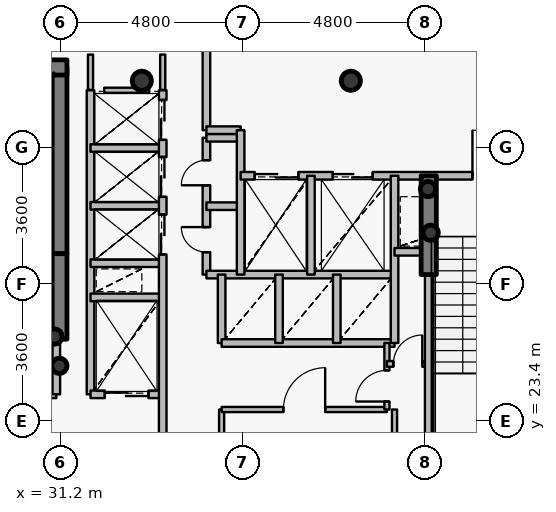
"""IFC4 building model, lengths in metres.
Left out: names, types, materials, properties, quantities, classifications, styles, units other than length and angle.
Written with IfcOpenShell. Run it as: python <this file> out.ifc"""

import sys

from ifc_helpers import new_model, si_unit, direction, frame, frame_2d, origin, origin_2d, place, context, subcontext, project, spatial, rectangle, hollow_circle, extrude, source, transform, mapped, element, fill, save


model = new_model("IFC4")
c1 = context("Model", 3, precision=1e-05, world=origin(), true_north=direction((0.0, 1.0)))
c2 = subcontext(c1, "Body", "Model", "MODEL_VIEW")
j1 = project(units=[si_unit("LENGTHUNIT", "METRE"), si_unit("PLANEANGLEUNIT", "RADIAN")], contexts=[c1])
p1 = place(None, origin())
s1 = spatial("IfcSite", under=j1, at=p1, CompositionType="ELEMENT")
p2 = place(p1, origin())
s2 = spatial("IfcBuilding", under=s1, at=p2, CompositionType="ELEMENT")
p3 = place(p2, frame((0.0, 0.0, 232.8)))
s3 = spatial("IfcBuildingStorey", under=s2, at=p3, CompositionType="ELEMENT", Elevation=232.8)
for number, where, z_axis, x_axis in (
    (1, (38.85, 32.35, 0.0), (0.0, 0.0, 1.0), (1.0, 0.0, 0.0)),
    (2, (33.35, 32.35, 0.0), (0.0, 0.0, 1.0), (1.0, 0.0, 0.0)),
):
    element("IfcColumn", number, at=place(p3, frame(where, z_axis=z_axis, x_axis=x_axis)), inside=s3, PredefinedType="COLUMN", context=c2, shape_type="SweptSolid", body=[
        extrude(hollow_circle(Radius=0.254, WallThickness=0.02, at=origin_2d()), origin(), (0.0, 0.0, 1.0), 3.75),
    ])
p4 = place(p3, frame((31.18, 27.8, 0.0), z_axis=(0.0, 0.0, 1.0), x_axis=(0.0, 1.0, 0.0)))
e3 = element("IfcWall", 3, at=p4, inside=s3, PredefinedType="SHEAR", context=c2, shape_type="SweptSolid", body=[
    extrude(rectangle(XDim=4.9, YDim=0.4, at=frame_2d((2.45, 0.0))), origin(), (0.0, 0.0, 1.0), 3.75),
])
p5 = place(p3, frame((27.28, 32.7, 0.0), z_axis=(0.0, 0.0, 1.0), x_axis=(1.0, 0.0, 0.0)))
e4 = element("IfcWall", 4, at=p5, inside=s3, PredefinedType="SHEAR", context=c2, shape_type="SweptSolid", body=[
    extrude(rectangle(XDim=4.1, YDim=0.4, at=frame_2d((2.05, 0.0))), origin(), (0.0, 0.0, 1.0), 3.75),
])
for number, where, z_axis, x_axis in (
    (5, (31.05, 25.62, 0.0), (0.0, 0.0, 1.0), (1.0, 0.0, 0.0)),
    (6, (31.18, 24.85, 0.0), (0.0, 0.0, 1.0), (1.0, 0.0, 0.0)),
    (7, (40.95, 28.35, 0.0), (0.0, 0.0, 1.0), (1.0, 0.0, 0.0)),
    (8, (40.88, 29.5, 0.0), (0.0, 0.0, 1.0), (1.0, 0.0, 0.0)),
):
    element("IfcColumn", number, at=place(p3, frame(where, z_axis=z_axis, x_axis=x_axis)), inside=s3, PredefinedType="COLUMN", context=c2, shape_type="SweptSolid", body=[
        extrude(hollow_circle(Radius=0.203, WallThickness=0.016, at=origin_2d()), origin(), (0.0, 0.0, 1.0), 3.75),
    ])
p6 = place(p3, frame((31.18, 25.55, 0.0), z_axis=(0.0, 0.0, 1.0), x_axis=(0.0, 1.0, 0.0)))
e9 = element("IfcWall", 9, at=p6, inside=s3, PredefinedType="SHEAR", context=c2, shape_type="SweptSolid", body=[
    extrude(rectangle(XDim=2.25, YDim=0.4, at=frame_2d((1.125, 0.0))), origin(), (0.0, 0.0, 1.0), 3.1),
])
p7 = place(p3, frame((40.9, 27.25, 0.0), z_axis=(0.0, 0.0, 1.0), x_axis=(0.0, 1.0, 0.0)))
e10 = element("IfcWall", 10, at=p7, inside=s3, PredefinedType="SHEAR", context=c2, shape_type="SweptSolid", body=[
    extrude(rectangle(XDim=2.6, YDim=0.4, at=frame_2d((1.3, 0.0))), origin(), (0.0, 0.0, 1.0), 3.1),
])
p8 = place(p3, frame((27.56, 24.1, 0.0), z_axis=(0.0, 0.0, 1.0), x_axis=(1.0, 0.0, 0.0)))
e11 = element("IfcWall", 11, at=p8, inside=s3, PredefinedType="PARTITIONING", context=c2, shape_type="SweptSolid", body=[
    extrude(rectangle(XDim=3.54, YDim=0.2, at=frame_2d((1.77, 0.0))), origin(), (0.0, 0.0, 1.0), 3.5),
])
p9 = place(p8, frame((1.17, 0.0, 0.0)))
e12 = element("IfcOpeningElement", 12, at=p9, cuts=e11, PredefinedType="OPENING", context=c2, shape_type="SweptSolid", body=[
    extrude(rectangle(XDim=1.2, YDim=2.15, at=origin_2d()), frame((0.6, 0.11, 1.075), z_axis=(0.0, -1.0, 0.0), x_axis=(1.0, 0.0, 0.0)), (0.0, 0.0, 1.0), 0.22),
])
p10 = place(p3, frame((31.1, 24.1, 0.0), z_axis=(0.0, 0.0, 1.0), x_axis=(0.0, 1.0, 0.0)))
e13 = element("IfcWall", 13, at=p10, inside=s3, PredefinedType="PARTITIONING", context=c2, shape_type="SweptSolid", body=[
    extrude(rectangle(XDim=1.44, YDim=0.2, at=frame_2d((0.72, 0.0))), origin(), (0.0, 0.0, 1.0), 3.5),
])
p11 = place(p3, frame((32.0, 24.1, 0.0), z_axis=(0.0, 0.0, 1.0), x_axis=(0.0, 1.0, 0.0)))
e14 = element("IfcWall", 14, at=p11, inside=s3, PredefinedType="PARTITIONING", context=c2, shape_type="SweptSolid", body=[
    extrude(rectangle(XDim=8.0, YDim=0.2, at=frame_2d((4.0, 0.0))), origin(), (0.0, 0.0, 1.0), 3.5),
])
p12 = place(p3, frame((32.0, 24.1, 0.0), z_axis=(0.0, 0.0, 1.0), x_axis=(1.0, 0.0, 0.0)))
e15 = element("IfcWall", 15, at=p12, inside=s3, PredefinedType="PARTITIONING", context=c2, shape_type="SweptSolid", body=[
    extrude(rectangle(XDim=1.9, YDim=0.2, at=frame_2d((0.95, 0.0))), origin(), (0.0, 0.0, 1.0), 3.085),
])
p13 = place(p12, frame((0.375, 0.0, 0.0)))
e16 = element("IfcOpeningElement", 16, at=p13, cuts=e15, PredefinedType="OPENING", context=c2, shape_type="SweptSolid", body=[
    extrude(rectangle(XDim=1.15, YDim=2.15, at=origin_2d()), frame((0.575, 0.11, 1.075), z_axis=(0.0, -1.0, 0.0), x_axis=(1.0, 0.0, 0.0)), (0.0, 0.0, 1.0), 0.22),
])
for number, where, z_axis, x_axis in (
    (17, (32.0, 26.65, 0.0), (0.0, 0.0, 1.0), (1.0, 0.0, 0.0)),
    (18, (32.0, 27.55, 0.0), (0.0, 0.0, 1.0), (1.0, 0.0, 0.0)),
    (19, (32.0, 29.06, 0.0), (0.0, 0.0, 1.0), (1.0, 0.0, 0.0)),
    (20, (32.0, 30.58, 0.0), (0.0, 0.0, 1.0), (1.0, 0.0, 0.0)),
):
    element("IfcWall", number, at=place(p3, frame(where, z_axis=z_axis, x_axis=x_axis)), inside=s3, PredefinedType="PARTITIONING", context=c2, shape_type="SweptSolid", body=[
        extrude(rectangle(XDim=1.9, YDim=0.2, at=frame_2d((0.95, 0.0))), origin(), (0.0, 0.0, 1.0), 3.085),
    ])
p14 = place(p3, frame((33.9, 20.7, 0.0), z_axis=(0.0, 0.0, 1.0), x_axis=(0.0, 1.0, 0.0)))
e21 = element("IfcWall", 21, at=p14, inside=s3, PredefinedType="PARTITIONING", context=c2, shape_type="SweptSolid", body=[
    extrude(rectangle(XDim=11.4, YDim=0.2, at=frame_2d((5.7, 0.0))), origin(), (0.0, 0.0, 1.0), 3.085),
])
p15 = place(p14, frame((7.08, 0.0, 0.0)))
e22 = element("IfcOpeningElement", 22, at=p15, cuts=e21, PredefinedType="OPENING", context=c2, shape_type="SweptSolid", body=[
    extrude(rectangle(XDim=1.05, YDim=2.15, at=origin_2d()), frame((0.525, 0.11, 1.075), z_axis=(0.0, -1.0, 0.0), x_axis=(1.0, 0.0, 0.0)), (0.0, 0.0, 1.0), 0.22),
])
p16 = place(p14, frame((8.595, 0.0, 0.0)))
e23 = element("IfcOpeningElement", 23, at=p16, cuts=e21, PredefinedType="OPENING", context=c2, shape_type="SweptSolid", body=[
    extrude(rectangle(XDim=1.05, YDim=2.15, at=origin_2d()), frame((0.525, 0.11, 1.075), z_axis=(0.0, -1.0, 0.0), x_axis=(1.0, 0.0, 0.0)), (0.0, 0.0, 1.0), 0.22),
])
p17 = place(p14, frame((10.095, 0.0, 0.0)))
e24 = element("IfcOpeningElement", 24, at=p17, cuts=e21, PredefinedType="OPENING", context=c2, shape_type="SweptSolid", body=[
    extrude(rectangle(XDim=1.05, YDim=2.15, at=origin_2d()), frame((0.525, 0.11, 1.075), z_axis=(0.0, -1.0, 0.0), x_axis=(1.0, 0.0, 0.0)), (0.0, 0.0, 1.0), 0.22),
])
p18 = place(p3, frame((35.05, 27.25, 0.0), z_axis=(0.0, 0.0, 1.0), x_axis=(0.0, 1.0, 0.0)))
e25 = element("IfcWall", 25, at=p18, inside=s3, PredefinedType="PARTITIONING", context=c2, shape_type="SweptSolid", body=[
    extrude(rectangle(XDim=3.6, YDim=0.2, at=frame_2d((1.8, 0.0))), origin(), (0.0, 0.0, 1.0), 3.5),
])
p19 = place(p18, frame((0.59, 0.0, 0.0)))
e26 = element("IfcOpeningElement", 26, at=p19, cuts=e25, PredefinedType="OPENING", context=c2, shape_type="SweptSolid", body=[
    extrude(rectangle(XDim=0.66, YDim=2.05, at=origin_2d()), frame((0.33, 0.11, 1.025), z_axis=(0.0, -1.0, 0.0), x_axis=(1.0, 0.0, 0.0)), (0.0, 0.0, 1.0), 0.22),
])
p20 = place(p18, frame((2.35, 0.0, 0.0)))
e27 = element("IfcOpeningElement", 27, at=p20, cuts=e25, PredefinedType="OPENING", context=c2, shape_type="SweptSolid", body=[
    extrude(rectangle(XDim=0.66, YDim=2.05, at=origin_2d()), frame((0.33, 0.11, 1.025), z_axis=(0.0, -1.0, 0.0), x_axis=(1.0, 0.0, 0.0)), (0.0, 0.0, 1.0), 0.22),
])
p21 = place(p3, frame((35.05, 27.25, 0.0), z_axis=(0.0, 0.0, 1.0), x_axis=(1.0, 0.0, 0.0)))
e28 = element("IfcWall", 28, at=p21, inside=s3, PredefinedType="PARTITIONING", context=c2, shape_type="SweptSolid", body=[
    extrude(rectangle(XDim=4.95, YDim=0.2, at=frame_2d((2.475, 0.0))), origin(), (0.0, 0.0, 1.0), 3.085),
])
for number, where, z_axis, x_axis in (
    (29, (35.05, 29.05, 0.0), (0.0, 0.0, 1.0), (1.0, 0.0, 0.0)),
    (30, (35.05, 30.85, 0.0), (0.0, 0.0, 1.0), (1.0, 0.0, 0.0)),
):
    element("IfcWall", number, at=place(p3, frame(where, z_axis=z_axis, x_axis=x_axis)), inside=s3, PredefinedType="PARTITIONING", context=c2, shape_type="SweptSolid", body=[
        extrude(rectangle(XDim=0.9, YDim=0.2, at=frame_2d((0.45, 0.0))), origin(), (0.0, 0.0, 1.0), 3.5),
    ])
p22 = place(p3, frame((35.05, 31.05, 0.0), z_axis=(0.0, 0.0, 1.0), x_axis=(0.0, 1.0, 0.0)))
e31 = element("IfcWall", 31, at=p22, inside=s3, PredefinedType="PARTITIONING", context=c2, shape_type="SweptSolid", body=[
    extrude(rectangle(XDim=2.25, YDim=0.2, at=frame_2d((1.125, 0.0))), origin(), (0.0, 0.0, 1.0), 3.085),
])
p23 = place(p3, frame((35.05, 31.05, 0.0), z_axis=(0.0, 0.0, 1.0), x_axis=(1.0, 0.0, 0.0)))
e32 = element("IfcWall", 32, at=p23, inside=s3, PredefinedType="PARTITIONING", context=c2, shape_type="SweptSolid", body=[
    extrude(rectangle(XDim=0.9, YDim=0.2, at=frame_2d((0.45, 0.0))), origin(), (0.0, 0.0, 1.0), 3.5),
])
p24 = place(p3, frame((35.45, 20.7, 0.0), z_axis=(0.0, 0.0, 1.0), x_axis=(0.0, 1.0, 0.0)))
e33 = element("IfcWall", 33, at=p24, inside=s3, PredefinedType="PARTITIONING", context=c2, shape_type="SweptSolid", body=[
    extrude(rectangle(XDim=3.0, YDim=0.135, at=frame_2d((1.5, 0.0))), origin(), (0.0, 0.0, 1.0), 3.085),
])
p25 = place(p3, frame((35.45, 23.7, 0.0), z_axis=(0.0, 0.0, 1.0), x_axis=(1.0, 0.0, 0.0)))
e34 = element("IfcWall", 34, at=p25, inside=s3, PredefinedType="PARTITIONING", context=c2, shape_type="SweptSolid", body=[
    extrude(rectangle(XDim=4.35, YDim=0.135, at=frame_2d((2.175, 0.0))), origin(), (0.0, 0.0, 1.0), 3.085),
])
p26 = place(p25, frame((1.625, 0.0, 0.0)))
e35 = element("IfcOpeningElement", 35, at=p26, cuts=e34, PredefinedType="OPENING", context=c2, shape_type="SweptSolid", body=[
    extrude(rectangle(XDim=1.1, YDim=2.15, at=origin_2d()), frame((0.55, 0.078, 1.075), z_axis=(0.0, -1.0, 0.0), x_axis=(1.0, 0.0, 0.0)), (0.0, 0.0, 1.0), 0.155),
])
p27 = place(p3, frame((35.45, 25.45, 0.0), z_axis=(0.0, 0.0, 1.0), x_axis=(0.0, 1.0, 0.0)))
e36 = element("IfcWall", 36, at=p27, inside=s3, PredefinedType="PARTITIONING", context=c2, shape_type="SweptSolid", body=[
    extrude(rectangle(XDim=1.8, YDim=0.2, at=frame_2d((0.9, 0.0))), origin(), (0.0, 0.0, 1.0), 3.5),
])
p28 = place(p3, frame((35.45, 25.45, 0.0), z_axis=(0.0, 0.0, 1.0), x_axis=(1.0, 0.0, 0.0)))
e37 = element("IfcWall", 37, at=p28, inside=s3, PredefinedType="PARTITIONING", context=c2, shape_type="SweptSolid", body=[
    extrude(rectangle(XDim=4.55, YDim=0.2, at=frame_2d((2.275, 0.0))), origin(), (0.0, 0.0, 1.0), 3.085),
])
p29 = place(p3, frame((35.95, 27.25, 0.0), z_axis=(0.0, 0.0, 1.0), x_axis=(0.0, 1.0, 0.0)))
e38 = element("IfcWall", 38, at=p29, inside=s3, PredefinedType="PARTITIONING", context=c2, shape_type="SweptSolid", body=[
    extrude(rectangle(XDim=3.8, YDim=0.2, at=frame_2d((1.9, 0.0))), origin(), (0.0, 0.0, 1.0), 3.5),
])
p30 = place(p3, frame((35.95, 29.85, 0.0), z_axis=(0.0, 0.0, 1.0), x_axis=(1.0, 0.0, 0.0)))
e39 = element("IfcWall", 39, at=p30, inside=s3, PredefinedType="PARTITIONING", context=c2, shape_type="SweptSolid", body=[
    extrude(rectangle(XDim=8.49, YDim=0.2, at=frame_2d((4.245, 0.0))), origin(), (0.0, 0.0, 1.0), 3.085),
])
p31 = place(p30, frame((6.1, 0.0, 0.0)))
e40 = element("IfcOpeningElement", 40, at=p31, cuts=e39, PredefinedType="OPENING", context=c2, shape_type="SweptSolid", body=[
    extrude(rectangle(XDim=1.2, YDim=2.15, at=origin_2d()), frame((0.6, 0.11, 1.075), z_axis=(0.0, -1.0, 0.0), x_axis=(1.0, 0.0, 0.0)), (0.0, 0.0, 1.0), 0.22),
])
p32 = place(p30, frame((0.37, 0.0, 0.0)))
e41 = element("IfcOpeningElement", 41, at=p32, cuts=e39, PredefinedType="OPENING", context=c2, shape_type="SweptSolid", body=[
    extrude(rectangle(XDim=1.15, YDim=2.15, at=origin_2d()), frame((0.575, 0.11, 1.075), z_axis=(0.0, -1.0, 0.0), x_axis=(1.0, 0.0, 0.0)), (0.0, 0.0, 1.0), 0.22),
])
p33 = place(p30, frame((2.425, 0.0, 0.0)))
e42 = element("IfcOpeningElement", 42, at=p33, cuts=e39, PredefinedType="OPENING", context=c2, shape_type="SweptSolid", body=[
    extrude(rectangle(XDim=1.05, YDim=2.15, at=origin_2d()), frame((0.525, 0.11, 1.075), z_axis=(0.0, -1.0, 0.0), x_axis=(1.0, 0.0, 0.0)), (0.0, 0.0, 1.0), 0.22),
])
p34 = place(p3, frame((36.96, 25.45, 0.0), z_axis=(0.0, 0.0, 1.0), x_axis=(0.0, 1.0, 0.0)))
e43 = element("IfcWall", 43, at=p34, inside=s3, PredefinedType="PARTITIONING", context=c2, shape_type="SweptSolid", body=[
    extrude(rectangle(XDim=1.8, YDim=0.2, at=frame_2d((0.9, 0.0))), origin(), (0.0, 0.0, 1.0), 3.5),
])
p35 = place(p3, frame((37.8, 27.25, 0.0), z_axis=(0.0, 0.0, 1.0), x_axis=(0.0, 1.0, 0.0)))
e44 = element("IfcWall", 44, at=p35, inside=s3, PredefinedType="PARTITIONING", context=c2, shape_type="SweptSolid", body=[
    extrude(rectangle(XDim=2.6, YDim=0.2, at=frame_2d((1.3, 0.0))), origin(), (0.0, 0.0, 1.0), 3.5),
])
p36 = place(p3, frame((38.48, 25.45, 0.0), z_axis=(0.0, 0.0, 1.0), x_axis=(0.0, 1.0, 0.0)))
e45 = element("IfcWall", 45, at=p36, inside=s3, PredefinedType="PARTITIONING", context=c2, shape_type="SweptSolid", body=[
    extrude(rectangle(XDim=1.8, YDim=0.2, at=frame_2d((0.9, 0.0))), origin(), (0.0, 0.0, 1.0), 3.5),
])
p37 = place(p3, frame((39.8, 23.7, 0.0), z_axis=(0.0, 0.0, 1.0), x_axis=(0.0, 1.0, 0.0)))
e46 = element("IfcWall", 46, at=p37, inside=s3, PredefinedType="PARTITIONING", context=c2, shape_type="SweptSolid", body=[
    extrude(rectangle(XDim=1.75, YDim=0.135, at=frame_2d((0.875, 0.0))), origin(), (0.0, 0.0, 1.0), 3.5),
])
p38 = place(p37, frame((0.21, 0.0, 0.0)))
e47 = element("IfcOpeningElement", 47, at=p38, cuts=e46, PredefinedType="OPENING", context=c2, shape_type="SweptSolid", body=[
    extrude(rectangle(XDim=0.82, YDim=2.1, at=origin_2d()), frame((0.41, 0.078, 1.05), z_axis=(0.0, -1.0, 0.0), x_axis=(1.0, 0.0, 0.0)), (0.0, 0.0, 1.0), 0.155),
])
p39 = place(p3, frame((39.8, 24.9, 0.0), z_axis=(0.0, 0.0, 1.0), x_axis=(1.0, 0.0, 0.0)))
e48 = element("IfcWall", 48, at=p39, inside=s3, PredefinedType="PARTITIONING", context=c2, shape_type="SweptSolid", body=[
    extrude(rectangle(XDim=1.1, YDim=0.15, at=frame_2d((0.55, 0.0))), origin(), (0.0, 0.0, 1.0), 3.5),
])
p40 = place(p39, frame((0.17, 0.0, 0.0)))
e49 = element("IfcOpeningElement", 49, at=p40, cuts=e48, PredefinedType="OPENING", context=c2, shape_type="SweptSolid", body=[
    extrude(rectangle(XDim=0.76, YDim=2.1, at=origin_2d()), frame((0.38, 0.085, 1.05), z_axis=(0.0, -1.0, 0.0), x_axis=(1.0, 0.0, 0.0)), (0.0, 0.0, 1.0), 0.17),
])
p41 = place(p3, frame((40.0, 25.45, 0.0), z_axis=(0.0, 0.0, 1.0), x_axis=(0.0, 1.0, 0.0)))
e50 = element("IfcWall", 50, at=p41, inside=s3, PredefinedType="PARTITIONING", context=c2, shape_type="SweptSolid", body=[
    extrude(rectangle(XDim=4.4, YDim=0.2, at=frame_2d((2.2, 0.0))), origin(), (0.0, 0.0, 1.0), 3.5),
])
p42 = place(p3, frame((40.0, 27.85, 0.0), z_axis=(0.0, 0.0, 1.0), x_axis=(1.0, 0.0, 0.0)))
e51 = element("IfcWall", 51, at=p42, inside=s3, PredefinedType="PARTITIONING", context=c2, shape_type="SweptSolid", body=[
    extrude(rectangle(XDim=0.9, YDim=0.2, at=frame_2d((0.45, 0.0))), origin(), (0.0, 0.0, 1.0), 3.5),
])
p43 = place(p3, frame((40.9, 21.33, 0.0), z_axis=(0.0, 0.0, 1.0), x_axis=(0.0, 1.0, 0.0)))
e52 = element("IfcWall", 52, at=p43, inside=s3, PredefinedType="PARTITIONING", context=c2, shape_type="SweptSolid", body=[
    extrude(rectangle(XDim=5.91, YDim=0.2, at=frame_2d((2.955, 0.0))), origin(), (0.0, 0.0, 1.0), 3.035),
])
p44 = place(p3, frame((32.36, 32.1, 0.0), z_axis=(0.0, 0.0, 1.0), x_axis=(1.0, 0.0, 0.0)))
e53 = element("IfcWall", 53, at=p44, inside=s3, PredefinedType="PARTITIONING", context=c2, shape_type="SweptSolid", body=[
    extrude(rectangle(XDim=1.18, YDim=0.135, at=frame_2d((0.59, 0.0))), origin(), (0.0, 0.0, 1.0), 3.085),
])
p45 = place(p3, frame((40.0, 23.7, 0.0), z_axis=(0.0, 0.0, 1.0), x_axis=(0.0, -1.0, 0.0)))
e54 = element("IfcWall", 54, at=p45, inside=s3, PredefinedType="PARTITIONING", context=c2, shape_type="SweptSolid", body=[
    extrude(rectangle(XDim=2.74, YDim=0.135, at=frame_2d((1.37, 0.0))), origin(), (0.0, 0.0, 1.0), 3.035),
])
p46 = place(p3, frame((32.0, 33.04, 0.0), z_axis=(0.0, 0.0, 1.0), x_axis=(0.0, -1.0, 0.0)))
e55 = element("IfcWall", 55, at=p46, inside=s3, PredefinedType="PARTITIONING", context=c2, shape_type="SweptSolid", body=[
    extrude(rectangle(XDim=0.93, YDim=0.135, at=frame_2d((0.465, 0.0))), origin(), (0.0, 0.0, 1.0), 3.035),
])
p47 = place(p3, frame((33.9, 32.11, 0.0), z_axis=(0.0, 0.0, 1.0), x_axis=(0.0, 1.0, 0.0)))
e56 = element("IfcWall", 56, at=p47, inside=s3, PredefinedType="PARTITIONING", context=c2, shape_type="SweptSolid", body=[
    extrude(rectangle(XDim=0.93, YDim=0.135, at=frame_2d((0.465, 0.0))), origin(), (0.0, 0.0, 1.0), 3.085),
])
m1 = source(origin(), c2, "Body", "SweptSolid", [
    extrude(rectangle(XDim=1.2, YDim=2.15, at=origin_2d()), frame((0.6, 0.025, 1.075), z_axis=(0.0, -1.0, 0.0), x_axis=(1.0, 0.0, 0.0)), (0.0, 0.0, 1.0), 0.05),
])
p48 = place(p31, origin())
e57 = element("IfcDoor", 57, at=p48, inside=s3, OperationType="SINGLE_SWING_LEFT", PredefinedType="DOOR", context=c2, shape_type="MappedRepresentation", body=[
    mapped(m1, transform((0.0, 0.0, 0.0), x_axis=(1.0, 0.0, 0.0), y_axis=(0.0, 1.0, 0.0), z_axis=(0.0, 0.0, 1.0), scale=1.0)),
])
fill(e40, e57)
m2 = source(origin(), c2, "Body", "SweptSolid", [
    extrude(rectangle(XDim=1.15, YDim=2.15, at=origin_2d()), frame((0.575, 0.025, 1.075), z_axis=(0.0, -1.0, 0.0), x_axis=(1.0, 0.0, 0.0)), (0.0, 0.0, 1.0), 0.05),
])
p49 = place(p32, origin())
e58 = element("IfcDoor", 58, at=p49, inside=s3, OperationType="DOUBLE_DOOR_SLIDING", PredefinedType="USERDEFINED", context=c2, shape_type="MappedRepresentation", body=[
    mapped(m2, transform((0.0, 0.0, 0.0), x_axis=(1.0, 0.0, 0.0), y_axis=(0.0, 1.0, 0.0), z_axis=(0.0, 0.0, 1.0), scale=1.0)),
])
fill(e41, e58)
p50 = place(p13, origin())
e59 = element("IfcDoor", 59, at=p50, inside=s3, OperationType="DOUBLE_DOOR_SLIDING", PredefinedType="USERDEFINED", context=c2, shape_type="MappedRepresentation", body=[
    mapped(m2, transform((0.0, 0.0, 0.0), x_axis=(1.0, 0.0, 0.0), y_axis=(0.0, 1.0, 0.0), z_axis=(0.0, 0.0, 1.0), scale=1.0)),
])
fill(e16, e59)
m3 = source(origin(), c2, "Body", "SweptSolid", [
    extrude(rectangle(XDim=1.05, YDim=2.15, at=origin_2d()), frame((0.525, 0.025, 1.075), z_axis=(0.0, -1.0, 0.0), x_axis=(1.0, 0.0, 0.0)), (0.0, 0.0, 1.0), 0.05),
])
p51 = place(p33, origin())
e60 = element("IfcDoor", 60, at=p51, inside=s3, OperationType="DOUBLE_DOOR_SLIDING", PredefinedType="USERDEFINED", context=c2, shape_type="MappedRepresentation", body=[
    mapped(m3, transform((0.0, 0.0, 0.0), x_axis=(1.0, 0.0, 0.0), y_axis=(0.0, 1.0, 0.0), z_axis=(0.0, 0.0, 1.0), scale=1.0)),
])
fill(e42, e60)
p52 = place(p15, origin())
e61 = element("IfcDoor", 61, at=p52, inside=s3, OperationType="DOUBLE_DOOR_SLIDING", PredefinedType="USERDEFINED", context=c2, shape_type="MappedRepresentation", body=[
    mapped(m3, transform((0.0, 0.0, 0.0), x_axis=(1.0, 0.0, 0.0), y_axis=(0.0, 1.0, 0.0), z_axis=(0.0, 0.0, 1.0), scale=1.0)),
])
fill(e22, e61)
p53 = place(p16, origin())
e62 = element("IfcDoor", 62, at=p53, inside=s3, OperationType="DOUBLE_DOOR_SLIDING", PredefinedType="USERDEFINED", context=c2, shape_type="MappedRepresentation", body=[
    mapped(m3, transform((0.0, 0.0, 0.0), x_axis=(1.0, 0.0, 0.0), y_axis=(0.0, 1.0, 0.0), z_axis=(0.0, 0.0, 1.0), scale=1.0)),
])
fill(e23, e62)
p54 = place(p17, origin())
e63 = element("IfcDoor", 63, at=p54, inside=s3, OperationType="DOUBLE_DOOR_SLIDING", PredefinedType="USERDEFINED", context=c2, shape_type="MappedRepresentation", body=[
    mapped(m3, transform((0.0, 0.0, 0.0), x_axis=(1.0, 0.0, 0.0), y_axis=(0.0, 1.0, 0.0), z_axis=(0.0, 0.0, 1.0), scale=1.0)),
])
fill(e24, e63)
m4 = source(origin(), c2, "Body", "SweptSolid", [
    extrude(rectangle(XDim=0.66, YDim=2.05, at=origin_2d()), frame((0.33, 0.025, 1.025), z_axis=(0.0, -1.0, 0.0), x_axis=(1.0, 0.0, 0.0)), (0.0, 0.0, 1.0), 0.05),
])
p55 = place(p19, origin())
e64 = element("IfcDoor", 64, at=p55, inside=s3, OperationType="SINGLE_SWING_RIGHT", PredefinedType="USERDEFINED", context=c2, shape_type="MappedRepresentation", body=[
    mapped(m4, transform((0.0, 0.0, 0.0), x_axis=(1.0, 0.0, 0.0), y_axis=(0.0, 1.0, 0.0), z_axis=(0.0, 0.0, 1.0), scale=1.0)),
])
fill(e26, e64)
p56 = place(p20, origin())
e65 = element("IfcDoor", 65, at=p56, inside=s3, OperationType="SINGLE_SWING_LEFT", PredefinedType="USERDEFINED", context=c2, shape_type="MappedRepresentation", body=[
    mapped(m4, transform((0.0, 0.0, 0.0), x_axis=(1.0, 0.0, 0.0), y_axis=(0.0, 1.0, 0.0), z_axis=(0.0, 0.0, 1.0), scale=1.0)),
])
fill(e27, e65)
m5 = source(origin(), c2, "Body", "SweptSolid", [
    extrude(rectangle(XDim=1.1, YDim=2.15, at=origin_2d()), frame((0.55, 0.025, 1.075), z_axis=(0.0, -1.0, 0.0), x_axis=(1.0, 0.0, 0.0)), (0.0, 0.0, 1.0), 0.05),
])
p57 = place(p26, origin())
e66 = element("IfcDoor", 66, at=p57, inside=s3, OperationType="SINGLE_SWING_RIGHT", PredefinedType="DOOR", context=c2, shape_type="MappedRepresentation", body=[
    mapped(m5, transform((0.0, 0.0, 0.0), x_axis=(1.0, 0.0, 0.0), y_axis=(0.0, 1.0, 0.0), z_axis=(0.0, 0.0, 1.0), scale=1.0)),
])
fill(e35, e66)
m6 = source(origin(), c2, "Body", "SweptSolid", [
    extrude(rectangle(XDim=0.82, YDim=2.1, at=origin_2d()), frame((0.41, 0.025, 1.05), z_axis=(0.0, -1.0, 0.0), x_axis=(1.0, 0.0, 0.0)), (0.0, 0.0, 1.0), 0.05),
])
p58 = place(p38, origin())
e67 = element("IfcDoor", 67, at=p58, inside=s3, OperationType="SINGLE_SWING_LEFT", PredefinedType="DOOR", context=c2, shape_type="MappedRepresentation", body=[
    mapped(m6, transform((0.0, 0.0, 0.0), x_axis=(1.0, 0.0, 0.0), y_axis=(0.0, 1.0, 0.0), z_axis=(0.0, 0.0, 1.0), scale=1.0)),
])
fill(e47, e67)
m7 = source(origin(), c2, "Body", "SweptSolid", [
    extrude(rectangle(XDim=0.76, YDim=2.1, at=origin_2d()), frame((0.38, 0.025, 1.05), z_axis=(0.0, -1.0, 0.0), x_axis=(1.0, 0.0, 0.0)), (0.0, 0.0, 1.0), 0.05),
])
p59 = place(p40, origin())
e68 = element("IfcDoor", 68, at=p59, inside=s3, OperationType="SINGLE_SWING_RIGHT", PredefinedType="DOOR", context=c2, shape_type="MappedRepresentation", body=[
    mapped(m7, transform((0.0, 0.0, 0.0), x_axis=(1.0, 0.0, 0.0), y_axis=(0.0, 1.0, 0.0), z_axis=(0.0, 0.0, 1.0), scale=1.0)),
])
fill(e49, e68)
save(model, sys.argv[1])
